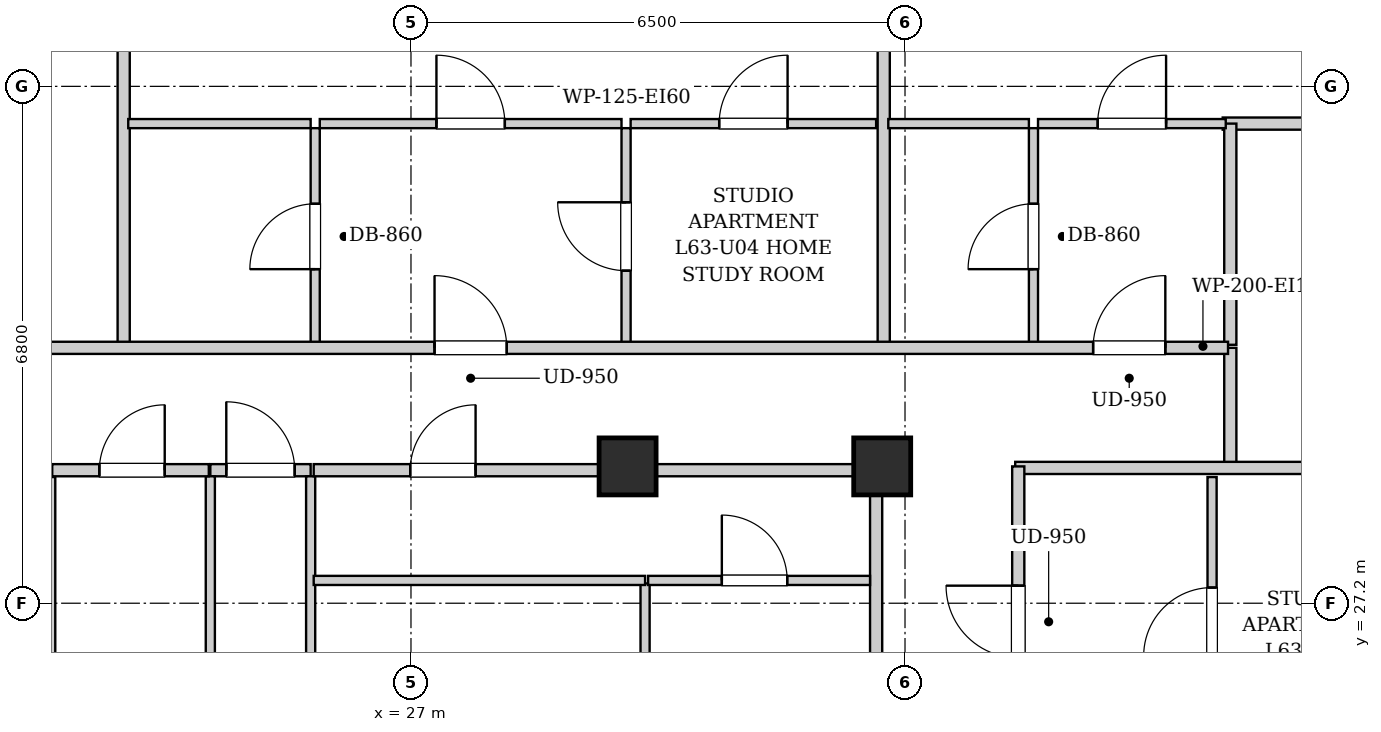
"""IFC4 building model, lengths in metres.
Left out: names, types, materials, properties, quantities, classifications, styles, units other than length and angle.
Written with IfcOpenShell. Run it as: python <this file> out.ifc"""

import sys

from ifc_helpers import new_model, si_unit, direction, frame, frame_2d, origin, origin_2d, place, context, subcontext, project, spatial, rectangle, extrude, element, fill, save


model = new_model("IFC4")
c1 = context("Model", 3, precision=1e-05, world=origin(), true_north=direction((0.0, 1.0)))
c2 = subcontext(c1, "Body", "Model", "MODEL_VIEW")
j1 = project(units=[si_unit("LENGTHUNIT", "METRE"), si_unit("PLANEANGLEUNIT", "RADIAN")], contexts=[c1])
p1 = place(None, origin())
s1 = spatial("IfcSite", under=j1, at=p1, CompositionType="ELEMENT")
p2 = place(p1, origin())
s2 = spatial("IfcBuilding", under=s1, at=p2, CompositionType="ELEMENT")
p3 = place(p2, frame((0.0, 0.0, 217.3)))
s3 = spatial("IfcBuildingStorey", under=s2, at=p3, CompositionType="ELEMENT", Elevation=217.3)
for number, where, z_axis, x_axis in (
    (1, (29.85, 29.0, 0.0), (0.0, 0.0, 1.0), (1.0, 0.0, 0.0)),
    (2, (33.2, 29.0, 0.0), (0.0, 0.0, 1.0), (1.0, 0.0, 0.0)),
):
    element("IfcColumn", number, at=place(p3, frame(where, z_axis=z_axis, x_axis=x_axis)), inside=s3, PredefinedType="COLUMN", context=c2, shape_type="SweptSolid", body=[
        extrude(rectangle(XDim=0.75, YDim=0.75, at=origin_2d()), origin(), (0.0, 0.0, 1.0), 3.4),
    ])
p4 = place(p3, frame((33.12, 24.12, 0.0), z_axis=(0.0, 0.0, 1.0), x_axis=(0.0, 1.0, 0.0)))
e3 = element("IfcWall", 3, at=p4, inside=s3, PredefinedType="PARTITIONING", context=c2, shape_type="SweptSolid", body=[
    extrude(rectangle(XDim=4.76, YDim=0.16, at=frame_2d((2.38, 0.0))), origin(), (0.0, 0.0, 1.0), 2.475),
])
p5 = place(p3, frame((24.36, 28.95, 0.0), z_axis=(0.0, 0.0, 1.0), x_axis=(1.0, 0.0, 0.0)))
e4 = element("IfcWall", 4, at=p5, inside=s3, PredefinedType="PARTITIONING", context=c2, shape_type="SweptSolid", body=[
    extrude(rectangle(XDim=1.32, YDim=0.16, at=frame_2d((0.66, 0.0))), origin(), (0.0, 0.0, 1.0), 2.668),
])
p6 = place(p5, frame((0.21, 0.0, 0.0)))
e5 = element("IfcOpeningElement", 5, at=p6, cuts=e4, PredefinedType="OPENING", context=c2, shape_type="SweptSolid", body=[
    extrude(rectangle(XDim=0.9, YDim=2.05, at=frame_2d((0.45, 1.025))), frame((0.0, 0.09, 0.0), z_axis=(0.0, -1.0, 0.0), x_axis=(1.0, 0.0, 0.0)), (0.0, 0.0, 1.0), 0.18),
])
for number, where, z_axis, x_axis in (
    (6, (24.36, 25.0, 0.0), (0.0, 0.0, 1.0), (0.0, 1.0, 0.0)),
    (7, (25.68, 25.0, 0.0), (0.0, 0.0, 1.0), (0.0, 1.0, 0.0)),
):
    element("IfcWall", number, at=place(p3, frame(where, z_axis=z_axis, x_axis=x_axis)), inside=s3, PredefinedType="PARTITIONING", context=c2, shape_type="SweptSolid", body=[
        extrude(rectangle(XDim=3.87, YDim=0.12, at=frame_2d((1.935, 0.0))), origin(), (0.0, 0.0, 1.0), 3.14),
    ])
p7 = place(p3, frame((30.08, 26.18, 0.0), z_axis=(0.0, 0.0, 1.0), x_axis=(0.0, 1.0, 0.0)))
e8 = element("IfcWall", 8, at=p7, inside=s3, PredefinedType="PARTITIONING", context=c2, shape_type="SweptSolid", body=[
    extrude(rectangle(XDim=1.28, YDim=0.12, at=frame_2d((0.64, 0.0))), origin(), (0.0, 0.0, 1.0), 3.14),
])
p8 = place(p3, frame((30.12, 27.5, 0.0), z_axis=(0.0, 0.0, 1.0), x_axis=(1.0, 0.0, 0.0)))
e9 = element("IfcWall", 9, at=p8, inside=s3, PredefinedType="PARTITIONING", context=c2, shape_type="SweptSolid", body=[
    extrude(rectangle(XDim=2.92, YDim=0.12, at=frame_2d((1.46, 0.0))), origin(), (0.0, 0.0, 1.0), 3.14),
])
p9 = place(p8, frame((0.97, 0.0, 0.0)))
e10 = element("IfcOpeningElement", 10, at=p9, cuts=e9, PredefinedType="OPENING", context=c2, shape_type="SweptSolid", body=[
    extrude(rectangle(XDim=0.86, YDim=2.05, at=frame_2d((0.43, 1.025))), frame((0.0, 0.07, 0.0), z_axis=(0.0, -1.0, 0.0), x_axis=(1.0, 0.0, 0.0)), (0.0, 0.0, 1.0), 0.14),
])
p10 = place(p3, frame((22.26, 25.0, 0.0), z_axis=(0.0, 0.0, 1.0), x_axis=(0.0, 1.0, 0.0)))
e11 = element("IfcWall", 11, at=p10, inside=s3, PredefinedType="PARTITIONING", context=c2, shape_type="SweptSolid", body=[
    extrude(rectangle(XDim=3.86, YDim=0.12, at=frame_2d((1.93, 0.0))), origin(), (0.0, 0.0, 1.0), 3.14),
])
p11 = place(p3, frame((22.28, 28.95, 0.0), z_axis=(0.0, 0.0, 1.0), x_axis=(1.0, 0.0, 0.0)))
e12 = element("IfcWall", 12, at=p11, inside=s3, PredefinedType="PARTITIONING", context=c2, shape_type="SweptSolid", body=[
    extrude(rectangle(XDim=2.06, YDim=0.16, at=frame_2d((1.03, 0.0))), origin(), (0.0, 0.0, 1.0), 2.668),
])
p12 = place(p11, frame((0.62, 0.0, 0.0)))
e13 = element("IfcOpeningElement", 13, at=p12, cuts=e12, PredefinedType="OPENING", context=c2, shape_type="SweptSolid", body=[
    extrude(rectangle(XDim=0.86, YDim=2.05, at=frame_2d((0.43, 1.025))), frame((0.0, 0.09, 0.0), z_axis=(0.0, -1.0, 0.0), x_axis=(1.0, 0.0, 0.0)), (0.0, 0.0, 1.0), 0.18),
])
p13 = place(p3, frame((25.72, 27.5, 0.0), z_axis=(0.0, 0.0, 1.0), x_axis=(1.0, 0.0, 0.0)))
e14 = element("IfcWall", 14, at=p13, inside=s3, PredefinedType="PARTITIONING", context=c2, shape_type="SweptSolid", body=[
    extrude(rectangle(XDim=4.36, YDim=0.12, at=frame_2d((2.18, 0.0))), origin(), (0.0, 0.0, 1.0), 3.14),
])
p14 = place(p3, frame((25.72, 28.95, 0.0), z_axis=(0.0, 0.0, 1.0), x_axis=(1.0, 0.0, 0.0)))
e15 = element("IfcWall", 15, at=p14, inside=s3, PredefinedType="PARTITIONING", context=c2, shape_type="SweptSolid", body=[
    extrude(rectangle(XDim=7.32, YDim=0.16, at=frame_2d((3.66, 0.0))), origin(), (0.0, 0.0, 1.0), 2.668),
])
p15 = place(p14, frame((1.27, 0.0, 0.0)))
e16 = element("IfcOpeningElement", 16, at=p15, cuts=e15, PredefinedType="OPENING", context=c2, shape_type="SweptSolid", body=[
    extrude(rectangle(XDim=0.86, YDim=2.05, at=frame_2d((0.43, 1.025))), frame((0.0, 0.09, 0.0), z_axis=(0.0, -1.0, 0.0), x_axis=(1.0, 0.0, 0.0)), (0.0, 0.0, 1.0), 0.18),
])
p16 = place(p3, frame((37.78, 28.98, 0.0), z_axis=(0.0, 0.0, 1.0), x_axis=(0.0, 1.0, 0.0)))
e17 = element("IfcWall", 17, at=p16, inside=s3, PredefinedType="PARTITIONING", context=c2, shape_type="SweptSolid", body=[
    extrude(rectangle(XDim=1.58, YDim=0.16, at=frame_2d((0.79, 0.0))), origin(), (0.0, 0.0, 1.0), 3.14),
])
p17 = place(p3, frame((34.95, 28.98, 0.0), z_axis=(0.0, 0.0, 1.0), x_axis=(1.0, 0.0, 0.0)))
e18 = element("IfcWall", 18, at=p17, inside=s3, PredefinedType="PARTITIONING", context=c2, shape_type="SweptSolid", body=[
    extrude(rectangle(XDim=5.07, YDim=0.16, at=frame_2d((2.535, 0.0))), origin(), (0.0, 0.0, 1.0), 2.668),
])
p18 = place(p3, frame((23.22, 30.6, 0.0), z_axis=(0.0, 0.0, 1.0), x_axis=(0.0, 1.0, 0.0)))
e19 = element("IfcWall", 19, at=p18, inside=s3, PredefinedType="PARTITIONING", context=c2, shape_type="SweptSolid", body=[
    extrude(rectangle(XDim=9.32, YDim=0.16, at=frame_2d((4.66, 0.0))), origin(), (0.0, 0.0, 1.0), 3.14),
])
p19 = place(p3, frame((25.74, 30.6, 0.0), z_axis=(0.0, 0.0, 1.0), x_axis=(0.0, 1.0, 0.0)))
e20 = element("IfcWall", 20, at=p19, inside=s3, PredefinedType="PARTITIONING", context=c2, shape_type="SweptSolid", body=[
    extrude(rectangle(XDim=2.85, YDim=0.12, at=frame_2d((1.425, 0.0))), origin(), (0.0, 0.0, 1.0), 3.14),
])
p20 = place(p19, frame((0.995, 0.0, 0.0)))
e21 = element("IfcOpeningElement", 21, at=p20, cuts=e20, PredefinedType="OPENING", context=c2, shape_type="SweptSolid", body=[
    extrude(rectangle(XDim=0.86, YDim=2.05, at=frame_2d((0.43, 1.025))), frame((0.0, 0.07, 0.0), z_axis=(0.0, -1.0, 0.0), x_axis=(1.0, 0.0, 0.0)), (0.0, 0.0, 1.0), 0.14),
])
p21 = place(p3, frame((23.28, 33.51, 0.0), z_axis=(0.0, 0.0, 1.0), x_axis=(1.0, 0.0, 0.0)))
e22 = element("IfcWall", 22, at=p21, inside=s3, PredefinedType="PARTITIONING", context=c2, shape_type="SweptSolid", body=[
    extrude(rectangle(XDim=2.4, YDim=0.12, at=frame_2d((1.2, 0.0))), origin(), (0.0, 0.0, 1.0), 3.14),
])
p22 = place(p3, frame((29.83, 30.6, 0.0), z_axis=(0.0, 0.0, 1.0), x_axis=(0.0, 1.0, 0.0)))
e23 = element("IfcWall", 23, at=p22, inside=s3, PredefinedType="PARTITIONING", context=c2, shape_type="SweptSolid", body=[
    extrude(rectangle(XDim=2.85, YDim=0.12, at=frame_2d((1.425, 0.0))), origin(), (0.0, 0.0, 1.0), 3.14),
])
p23 = place(p22, frame((0.975, 0.0, 0.0)))
e24 = element("IfcOpeningElement", 24, at=p23, cuts=e23, PredefinedType="OPENING", context=c2, shape_type="SweptSolid", body=[
    extrude(rectangle(XDim=0.9, YDim=2.05, at=frame_2d((0.45, 1.025))), frame((0.0, 0.07, 0.0), z_axis=(0.0, -1.0, 0.0), x_axis=(1.0, 0.0, 0.0)), (0.0, 0.0, 1.0), 0.14),
])
p24 = place(p3, frame((25.8, 33.51, 0.0), z_axis=(0.0, 0.0, 1.0), x_axis=(1.0, 0.0, 0.0)))
e25 = element("IfcWall", 25, at=p24, inside=s3, PredefinedType="PARTITIONING", context=c2, shape_type="SweptSolid", body=[
    extrude(rectangle(XDim=3.97, YDim=0.12, at=frame_2d((1.985, 0.0))), origin(), (0.0, 0.0, 1.0), 3.14),
])
p25 = place(p24, frame((1.535, 0.0, 0.0)))
e26 = element("IfcOpeningElement", 26, at=p25, cuts=e25, PredefinedType="OPENING", context=c2, shape_type="SweptSolid", body=[
    extrude(rectangle(XDim=0.9, YDim=2.05, at=frame_2d((0.45, 1.025))), frame((0.0, 0.07, 0.0), z_axis=(0.0, -1.0, 0.0), x_axis=(1.0, 0.0, 0.0)), (0.0, 0.0, 1.0), 0.14),
])
p26 = place(p3, frame((29.89, 33.51, 0.0), z_axis=(0.0, 0.0, 1.0), x_axis=(1.0, 0.0, 0.0)))
e27 = element("IfcWall", 27, at=p26, inside=s3, PredefinedType="PARTITIONING", context=c2, shape_type="SweptSolid", body=[
    extrude(rectangle(XDim=3.23, YDim=0.12, at=frame_2d((1.615, 0.0))), origin(), (0.0, 0.0, 1.0), 3.14),
])
p27 = place(p26, frame((1.165, 0.0, 0.0)))
e28 = element("IfcOpeningElement", 28, at=p27, cuts=e27, PredefinedType="OPENING", context=c2, shape_type="SweptSolid", body=[
    extrude(rectangle(XDim=0.9, YDim=2.05, at=frame_2d((0.45, 1.025))), frame((0.0, 0.07, 0.0), z_axis=(0.0, -1.0, 0.0), x_axis=(1.0, 0.0, 0.0)), (0.0, 0.0, 1.0), 0.14),
])
p28 = place(p3, frame((37.68, 33.51, 0.0), z_axis=(0.0, 0.0, 1.0), x_axis=(1.0, 0.0, 0.0)))
e29 = element("IfcWall", 29, at=p28, inside=s3, PredefinedType="PARTITIONING", context=c2, shape_type="SweptSolid", body=[
    extrude(rectangle(XDim=2.34, YDim=0.16, at=frame_2d((1.17, 0.0))), origin(), (0.0, 0.0, 1.0), 3.14),
])
p29 = place(p3, frame((37.78, 30.6, 0.0), z_axis=(0.0, 0.0, 1.0), x_axis=(0.0, 1.0, 0.0)))
e30 = element("IfcWall", 30, at=p29, inside=s3, PredefinedType="PARTITIONING", context=c2, shape_type="SweptSolid", body=[
    extrude(rectangle(XDim=2.91, YDim=0.16, at=frame_2d((1.455, 0.0))), origin(), (0.0, 0.0, 1.0), 3.14),
])
p30 = place(p3, frame((33.22, 30.6, 0.0), z_axis=(0.0, 0.0, 1.0), x_axis=(0.0, 1.0, 0.0)))
e31 = element("IfcWall", 31, at=p30, inside=s3, PredefinedType="PARTITIONING", context=c2, shape_type="SweptSolid", body=[
    extrude(rectangle(XDim=7.34, YDim=0.16, at=frame_2d((3.67, 0.0))), origin(), (0.0, 0.0, 1.0), 2.668),
])
p31 = place(p3, frame((35.19, 30.6, 0.0), z_axis=(0.0, 0.0, 1.0), x_axis=(0.0, 1.0, 0.0)))
e32 = element("IfcWall", 32, at=p31, inside=s3, PredefinedType="PARTITIONING", context=c2, shape_type="SweptSolid", body=[
    extrude(rectangle(XDim=2.85, YDim=0.12, at=frame_2d((1.425, 0.0))), origin(), (0.0, 0.0, 1.0), 3.14),
])
p32 = place(p31, frame((0.995, 0.0, 0.0)))
e33 = element("IfcOpeningElement", 33, at=p32, cuts=e32, PredefinedType="OPENING", context=c2, shape_type="SweptSolid", body=[
    extrude(rectangle(XDim=0.86, YDim=2.05, at=frame_2d((0.43, 1.025))), frame((0.0, 0.07, 0.0), z_axis=(0.0, -1.0, 0.0), x_axis=(1.0, 0.0, 0.0)), (0.0, 0.0, 1.0), 0.14),
])
p33 = place(p3, frame((33.28, 33.51, 0.0), z_axis=(0.0, 0.0, 1.0), x_axis=(1.0, 0.0, 0.0)))
e34 = element("IfcWall", 34, at=p33, inside=s3, PredefinedType="PARTITIONING", context=c2, shape_type="SweptSolid", body=[
    extrude(rectangle(XDim=1.85, YDim=0.12, at=frame_2d((0.925, 0.0))), origin(), (0.0, 0.0, 1.0), 3.14),
])
p34 = place(p3, frame((35.25, 33.51, 0.0), z_axis=(0.0, 0.0, 1.0), x_axis=(1.0, 0.0, 0.0)))
e35 = element("IfcWall", 35, at=p34, inside=s3, PredefinedType="PARTITIONING", context=c2, shape_type="SweptSolid", body=[
    extrude(rectangle(XDim=2.47, YDim=0.12, at=frame_2d((1.235, 0.0))), origin(), (0.0, 0.0, 1.0), 3.14),
])
p35 = place(p34, frame((0.785, 0.0, 0.0)))
e36 = element("IfcOpeningElement", 36, at=p35, cuts=e35, PredefinedType="OPENING", context=c2, shape_type="SweptSolid", body=[
    extrude(rectangle(XDim=0.9, YDim=2.05, at=frame_2d((0.45, 1.025))), frame((0.0, 0.07, 0.0), z_axis=(0.0, -1.0, 0.0), x_axis=(1.0, 0.0, 0.0)), (0.0, 0.0, 1.0), 0.14),
])
p36 = place(p3, frame((37.54, 25.052, 0.0), z_axis=(0.0, 0.0, 1.0), x_axis=(0.0, 1.0, 0.0)))
e37 = element("IfcWall", 37, at=p36, inside=s3, PredefinedType="PARTITIONING", context=c2, shape_type="SweptSolid", body=[
    extrude(rectangle(XDim=3.808, YDim=0.12, at=frame_2d((1.904, 0.0))), origin(), (0.0, 0.0, 1.0), 3.14),
])
p37 = place(p36, frame((1.454, 0.0, 0.0)))
e38 = element("IfcOpeningElement", 38, at=p37, cuts=e37, PredefinedType="OPENING", context=c2, shape_type="SweptSolid", body=[
    extrude(rectangle(XDim=0.9, YDim=2.05, at=frame_2d((0.45, 1.025))), frame((0.0, 0.07, 0.0), z_axis=(0.0, -1.0, 0.0), x_axis=(1.0, 0.0, 0.0)), (0.0, 0.0, 1.0), 0.14),
])
p38 = place(p3, frame((13.15, 30.56, 0.0), z_axis=(0.0, 0.0, 1.0), x_axis=(1.0, 0.0, 0.0)))
e39 = element("IfcWall", 39, at=p38, inside=s3, PredefinedType="PARTITIONING", context=c2, shape_type="SweptSolid", body=[
    extrude(rectangle(XDim=24.6, YDim=0.16, at=frame_2d((12.3, 0.0))), origin(), (0.0, 0.0, 1.0), 3.14),
])
p39 = place(p38, frame((5.185, 0.0, 0.0)))
e40 = element("IfcOpeningElement", 40, at=p39, cuts=e39, PredefinedType="OPENING", context=c2, shape_type="SweptSolid", body=[
    extrude(rectangle(XDim=0.95, YDim=2.1, at=frame_2d((0.475, 1.05))), frame((0.0, 0.09, 0.0), z_axis=(0.0, -1.0, 0.0), x_axis=(1.0, 0.0, 0.0)), (0.0, 0.0, 1.0), 0.18),
])
p40 = place(p38, frame((14.16, 0.0, 0.0)))
e41 = element("IfcOpeningElement", 41, at=p40, cuts=e39, PredefinedType="OPENING", context=c2, shape_type="SweptSolid", body=[
    extrude(rectangle(XDim=0.95, YDim=2.1, at=frame_2d((0.475, 1.05))), frame((0.0, 0.09, 0.0), z_axis=(0.0, -1.0, 0.0), x_axis=(1.0, 0.0, 0.0)), (0.0, 0.0, 1.0), 0.18),
])
p41 = place(p38, frame((22.825, 0.0, 0.0)))
e42 = element("IfcOpeningElement", 42, at=p41, cuts=e39, PredefinedType="OPENING", context=c2, shape_type="SweptSolid", body=[
    extrude(rectangle(XDim=0.95, YDim=2.1, at=frame_2d((0.475, 1.05))), frame((0.0, 0.09, 0.0), z_axis=(0.0, -1.0, 0.0), x_axis=(1.0, 0.0, 0.0)), (0.0, 0.0, 1.0), 0.18),
])
p42 = place(p3, frame((34.99, 15.07, 0.0), z_axis=(0.0, 0.0, 1.0), x_axis=(0.0, 1.0, 0.0)))
e43 = element("IfcWall", 43, at=p42, inside=s3, PredefinedType="PARTITIONING", context=c2, shape_type="SweptSolid", body=[
    extrude(rectangle(XDim=13.93, YDim=0.16, at=frame_2d((6.965, 0.0))), origin(), (0.0, 0.0, 1.0), 3.14),
])
p43 = place(p42, frame((4.661, 0.0, 0.0)))
e44 = element("IfcOpeningElement", 44, at=p43, cuts=e43, PredefinedType="OPENING", context=c2, shape_type="SweptSolid", body=[
    extrude(rectangle(XDim=0.95, YDim=2.1, at=frame_2d((0.475, 1.05))), frame((0.0, 0.09, 0.0), z_axis=(0.0, -1.0, 0.0), x_axis=(1.0, 0.0, 0.0)), (0.0, 0.0, 1.0), 0.18),
])
p44 = place(p42, frame((11.411, 0.0, 0.0)))
e45 = element("IfcOpeningElement", 45, at=p44, cuts=e43, PredefinedType="OPENING", context=c2, shape_type="SweptSolid", body=[
    extrude(rectangle(XDim=0.95, YDim=2.1, at=frame_2d((0.475, 1.05))), frame((0.0, 0.09, 0.0), z_axis=(0.0, -1.0, 0.0), x_axis=(1.0, 0.0, 0.0)), (0.0, 0.0, 1.0), 0.18),
])
p45 = place(p6, origin())
e46 = element("IfcDoor", 46, at=p45, inside=s3, OperationType="SINGLE_SWING_LEFT", PredefinedType="DOOR", context=c2, shape_type="SweptSolid", body=[
    extrude(rectangle(XDim=0.9, YDim=2.05, at=frame_2d((0.45, 1.025))), frame((0.0, 0.025, 0.0), z_axis=(0.0, -1.0, 0.0), x_axis=(1.0, 0.0, 0.0)), (0.0, 0.0, 1.0), 0.05),
])
fill(e5, e46)
p46 = place(p9, origin())
e47 = element("IfcDoor", 47, at=p46, inside=s3, OperationType="SINGLE_SWING_LEFT", PredefinedType="DOOR", context=c2, shape_type="SweptSolid", body=[
    extrude(rectangle(XDim=0.86, YDim=2.05, at=frame_2d((0.43, 1.025))), frame((0.0, 0.025, 0.0), z_axis=(0.0, -1.0, 0.0), x_axis=(1.0, 0.0, 0.0)), (0.0, 0.0, 1.0), 0.05),
])
fill(e10, e47)
p47 = place(p12, origin())
e48 = element("IfcDoor", 48, at=p47, inside=s3, OperationType="SINGLE_SWING_RIGHT", PredefinedType="DOOR", context=c2, shape_type="SweptSolid", body=[
    extrude(rectangle(XDim=0.86, YDim=2.05, at=frame_2d((0.43, 1.025))), frame((0.0, 0.025, 0.0), z_axis=(0.0, -1.0, 0.0), x_axis=(1.0, 0.0, 0.0)), (0.0, 0.0, 1.0), 0.05),
])
fill(e13, e48)
p48 = place(p15, origin())
e49 = element("IfcDoor", 49, at=p48, inside=s3, OperationType="SINGLE_SWING_RIGHT", PredefinedType="DOOR", context=c2, shape_type="SweptSolid", body=[
    extrude(rectangle(XDim=0.86, YDim=2.05, at=frame_2d((0.43, 1.025))), frame((0.0, 0.025, 0.0), z_axis=(0.0, -1.0, 0.0), x_axis=(1.0, 0.0, 0.0)), (0.0, 0.0, 1.0), 0.05),
])
fill(e16, e49)
p49 = place(p20, origin())
e50 = element("IfcDoor", 50, at=p49, inside=s3, OperationType="SINGLE_SWING_LEFT", PredefinedType="DOOR", context=c2, shape_type="SweptSolid", body=[
    extrude(rectangle(XDim=0.86, YDim=2.05, at=frame_2d((0.43, 1.025))), frame((0.0, 0.025, 0.0), z_axis=(0.0, -1.0, 0.0), x_axis=(1.0, 0.0, 0.0)), (0.0, 0.0, 1.0), 0.05),
])
fill(e21, e50)
p50 = place(p23, origin())
e51 = element("IfcDoor", 51, at=p50, inside=s3, OperationType="SINGLE_SWING_RIGHT", PredefinedType="DOOR", context=c2, shape_type="SweptSolid", body=[
    extrude(rectangle(XDim=0.9, YDim=2.05, at=frame_2d((0.45, 1.025))), frame((0.0, 0.025, 0.0), z_axis=(0.0, -1.0, 0.0), x_axis=(1.0, 0.0, 0.0)), (0.0, 0.0, 1.0), 0.05),
])
fill(e24, e51)
p51 = place(p25, origin())
e52 = element("IfcDoor", 52, at=p51, inside=s3, OperationType="SINGLE_SWING_LEFT", PredefinedType="DOOR", context=c2, shape_type="SweptSolid", body=[
    extrude(rectangle(XDim=0.9, YDim=2.05, at=frame_2d((0.45, 1.025))), frame((0.0, 0.025, 0.0), z_axis=(0.0, -1.0, 0.0), x_axis=(1.0, 0.0, 0.0)), (0.0, 0.0, 1.0), 0.05),
])
fill(e26, e52)
p52 = place(p27, origin())
e53 = element("IfcDoor", 53, at=p52, inside=s3, OperationType="SINGLE_SWING_RIGHT", PredefinedType="DOOR", context=c2, shape_type="SweptSolid", body=[
    extrude(rectangle(XDim=0.9, YDim=2.05, at=frame_2d((0.45, 1.025))), frame((0.0, 0.025, 0.0), z_axis=(0.0, -1.0, 0.0), x_axis=(1.0, 0.0, 0.0)), (0.0, 0.0, 1.0), 0.05),
])
fill(e28, e53)
p53 = place(p32, origin())
e54 = element("IfcDoor", 54, at=p53, inside=s3, OperationType="SINGLE_SWING_LEFT", PredefinedType="DOOR", context=c2, shape_type="SweptSolid", body=[
    extrude(rectangle(XDim=0.86, YDim=2.05, at=frame_2d((0.43, 1.025))), frame((0.0, 0.025, 0.0), z_axis=(0.0, -1.0, 0.0), x_axis=(1.0, 0.0, 0.0)), (0.0, 0.0, 1.0), 0.05),
])
fill(e33, e54)
p54 = place(p35, origin())
e55 = element("IfcDoor", 55, at=p54, inside=s3, OperationType="SINGLE_SWING_RIGHT", PredefinedType="DOOR", context=c2, shape_type="SweptSolid", body=[
    extrude(rectangle(XDim=0.9, YDim=2.05, at=frame_2d((0.45, 1.025))), frame((0.0, 0.025, 0.0), z_axis=(0.0, -1.0, 0.0), x_axis=(1.0, 0.0, 0.0)), (0.0, 0.0, 1.0), 0.05),
])
fill(e36, e55)
p55 = place(p37, origin())
e56 = element("IfcDoor", 56, at=p55, inside=s3, OperationType="SINGLE_SWING_LEFT", PredefinedType="DOOR", context=c2, shape_type="SweptSolid", body=[
    extrude(rectangle(XDim=0.9, YDim=2.05, at=frame_2d((0.45, 1.025))), frame((0.0, 0.025, 0.0), z_axis=(0.0, -1.0, 0.0), x_axis=(1.0, 0.0, 0.0)), (0.0, 0.0, 1.0), 0.05),
])
fill(e38, e56)
p56 = place(p40, origin())
e57 = element("IfcDoor", 57, at=p56, inside=s3, OperationType="SINGLE_SWING_LEFT", PredefinedType="DOOR", context=c2, shape_type="SweptSolid", body=[
    extrude(rectangle(XDim=0.95, YDim=2.1, at=frame_2d((0.475, 1.05))), frame((0.0, 0.025, 0.0), z_axis=(0.0, -1.0, 0.0), x_axis=(1.0, 0.0, 0.0)), (0.0, 0.0, 1.0), 0.05),
])
fill(e41, e57)
p57 = place(p41, origin())
e58 = element("IfcDoor", 58, at=p57, inside=s3, OperationType="SINGLE_SWING_RIGHT", PredefinedType="DOOR", context=c2, shape_type="SweptSolid", body=[
    extrude(rectangle(XDim=0.95, YDim=2.1, at=frame_2d((0.475, 1.05))), frame((0.0, 0.025, 0.0), z_axis=(0.0, -1.0, 0.0), x_axis=(1.0, 0.0, 0.0)), (0.0, 0.0, 1.0), 0.05),
])
fill(e42, e58)
p58 = place(p44, origin())
e59 = element("IfcDoor", 59, at=p58, inside=s3, OperationType="SINGLE_SWING_RIGHT", PredefinedType="DOOR", context=c2, shape_type="SweptSolid", body=[
    extrude(rectangle(XDim=0.95, YDim=2.1, at=frame_2d((0.475, 1.05))), frame((0.0, 0.025, 0.0), z_axis=(0.0, -1.0, 0.0), x_axis=(1.0, 0.0, 0.0)), (0.0, 0.0, 1.0), 0.05),
])
fill(e45, e59)
save(model, sys.argv[1])
